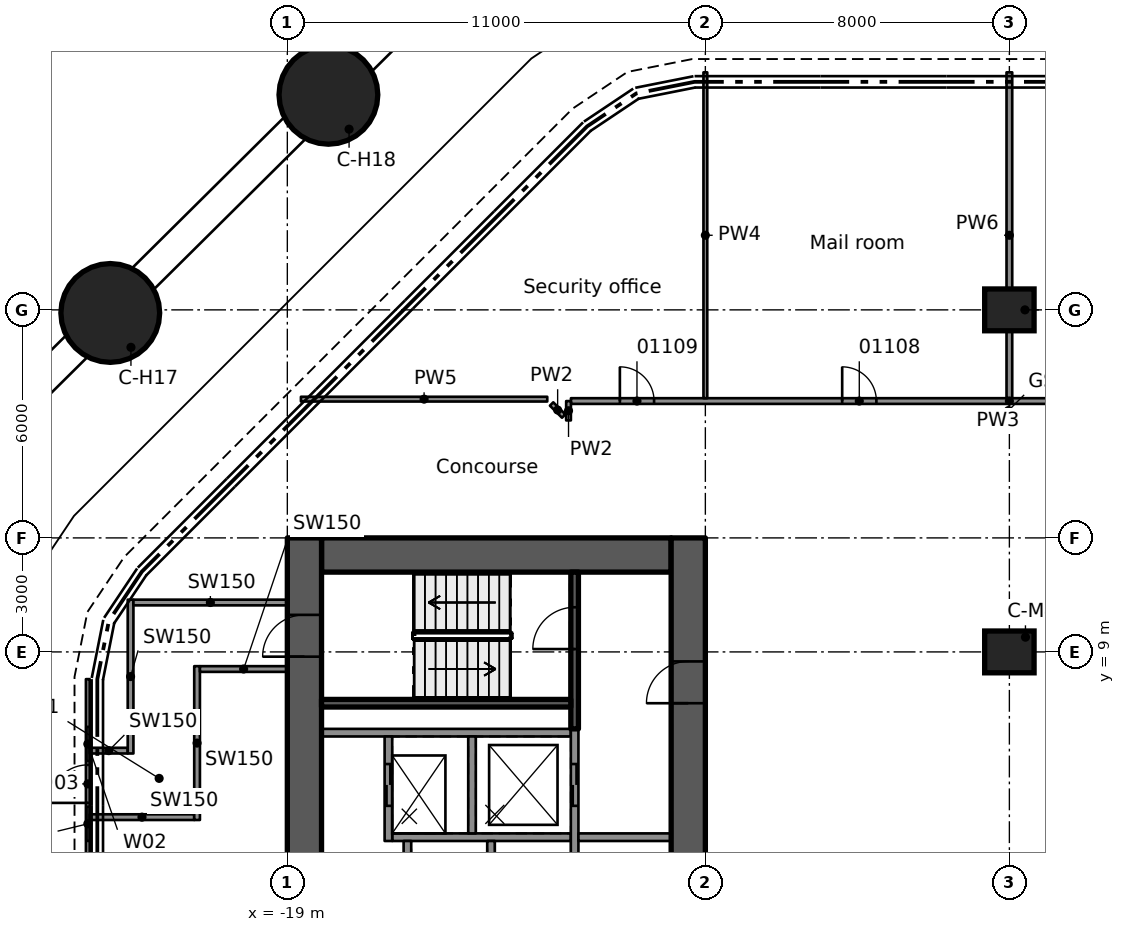
"""IFC4 building model, lengths in metres.
Left out: names, types, materials, properties, quantities, classifications, styles, units other than length and angle.
Written with IfcOpenShell. Run it as: python <this file> out.ifc"""

import sys

from ifc_helpers import new_model, si_unit, direction, frame, frame_2d, origin, origin_2d, place, context, subcontext, project, spatial, rectangle, circle, extrude, element, fill, save


model = new_model("IFC4")
c1 = context("Model", 3, precision=1e-05, world=origin(), true_north=direction((0.0, 1.0)))
c2 = subcontext(c1, "Body", "Model", "MODEL_VIEW")
j1 = project(units=[si_unit("LENGTHUNIT", "METRE"), si_unit("PLANEANGLEUNIT", "RADIAN")], contexts=[c1])
p1 = place(None, origin())
s1 = spatial("IfcSite", under=j1, at=p1, CompositionType="ELEMENT")
p2 = place(p1, origin())
s2 = spatial("IfcBuilding", under=s1, at=p2, CompositionType="ELEMENT")
p3 = place(p2, origin())
s3 = spatial("IfcBuildingStorey", under=s2, at=p3, CompositionType="ELEMENT", Elevation=0.0)
p4 = place(p3, frame((-18.1, 11.55, -0.5), z_axis=(0.0, 0.0, 1.0), x_axis=(1.0, 0.0, 0.0)))
e1 = element("IfcWall", 1, at=p4, inside=s3, PredefinedType="SHEAR", context=c2, shape_type="SweptSolid", body=[
    extrude(rectangle(XDim=9.2, YDim=0.9, at=frame_2d((4.6, 0.0))), origin(), (0.0, 0.0, 1.0), 11.0),
])
p5 = place(p3, frame((-18.55, -12.0, -0.5), z_axis=(0.0, 0.0, 1.0), x_axis=(0.0, 1.0, 0.0)))
e2 = element("IfcWall", 2, at=p5, inside=s3, PredefinedType="SHEAR", context=c2, shape_type="SweptSolid", body=[
    extrude(rectangle(XDim=24.0, YDim=0.9, at=frame_2d((12.0, 0.0))), origin(), (0.0, 0.0, 1.0), 11.0),
])
p6 = place(p5, frame((10.1, 0.0, 0.5)))
e3 = element("IfcOpeningElement", 3, at=p6, cuts=e2, PredefinedType="OPENING", context=c2, shape_type="SweptSolid", body=[
    extrude(rectangle(XDim=1.8, YDim=2.1, at=frame_2d((0.9, 1.05))), frame((0.0, 0.46, 0.0), z_axis=(0.0, -1.0, 0.0), x_axis=(1.0, 0.0, 0.0)), (0.0, 0.0, 1.0), 0.92),
])
p7 = place(p5, frame((20.875, 0.0, 0.5)))
e4 = element("IfcOpeningElement", 4, at=p7, cuts=e2, PredefinedType="OPENING", context=c2, shape_type="SweptSolid", body=[
    extrude(rectangle(XDim=1.1, YDim=2.1, at=frame_2d((0.55, 1.05))), frame((0.0, 0.46, 0.0), z_axis=(0.0, -1.0, 0.0), x_axis=(1.0, 0.0, 0.0)), (0.0, 0.0, 1.0), 0.92),
])
p8 = place(p3, frame((-8.45, -12.0, -0.5), z_axis=(0.0, 0.0, 1.0), x_axis=(0.0, 1.0, 0.0)))
e5 = element("IfcWall", 5, at=p8, inside=s3, PredefinedType="SHEAR", context=c2, shape_type="SweptSolid", body=[
    extrude(rectangle(XDim=24.0, YDim=0.9, at=frame_2d((12.0, 0.0))), origin(), (0.0, 0.0, 1.0), 11.0),
])
p9 = place(p8, frame((9.6, 0.0, 0.5)))
e6 = element("IfcOpeningElement", 6, at=p9, cuts=e5, PredefinedType="OPENING", context=c2, shape_type="SweptSolid", body=[
    extrude(rectangle(XDim=1.8, YDim=2.1, at=frame_2d((0.9, 1.05))), frame((0.0, 0.46, 0.0), z_axis=(0.0, -1.0, 0.0), x_axis=(1.0, 0.0, 0.0)), (0.0, 0.0, 1.0), 0.92),
])
p10 = place(p8, frame((19.65, 0.0, 0.5)))
e7 = element("IfcOpeningElement", 7, at=p10, cuts=e5, PredefinedType="OPENING", context=c2, shape_type="SweptSolid", body=[
    extrude(rectangle(XDim=1.1, YDim=2.1, at=frame_2d((0.55, 1.05))), frame((0.0, 0.46, 0.0), z_axis=(0.0, -1.0, 0.0), x_axis=(1.0, 0.0, 0.0)), (0.0, 0.0, 1.0), 0.92),
])
for number, where, z_axis, x_axis in (
    (8, (-23.659, 17.919, 0.6), (0.0, 0.0, 1.0), (1.0, 0.0, 0.0)),
    (9, (-17.919, 23.659, 0.6), (0.0, 0.0, 1.0), (1.0, 0.0, 0.0)),
):
    element("IfcColumn", number, at=place(p3, frame(where, z_axis=z_axis, x_axis=x_axis)), inside=s3, PredefinedType="COLUMN", context=c2, shape_type="SweptSolid", body=[
        extrude(circle(Radius=1.3, at=origin_2d()), origin(), (0.0, 0.0, 1.0), 8.9),
    ])
for number, where, z_axis, x_axis in (
    (10, (0.0, 9.0, -0.5), (0.0, 0.0, 1.0), (1.0, 0.0, 0.0)),
    (11, (0.0, 18.0, -0.5), (0.0, 0.0, 1.0), (1.0, 0.0, 0.0)),
):
    element("IfcColumn", number, at=place(p3, frame(where, z_axis=z_axis, x_axis=x_axis)), inside=s3, PredefinedType="COLUMN", context=c2, shape_type="SweptSolid", body=[
        extrude(rectangle(XDim=1.3, YDim=1.1, at=origin_2d()), origin(), (0.0, 0.0, 1.0), 11.0),
    ])
p11 = place(p3, frame((-11.54, 6.875, 0.0), z_axis=(0.0, 0.0, 1.0), x_axis=(-1.0, 0.0, 0.0)))
e12 = element("IfcWall", 12, at=p11, inside=s3, PredefinedType="SOLIDWALL", context=c2, shape_type="SweptSolid", body=[
    extrude(rectangle(XDim=6.56, YDim=0.2, at=frame_2d((3.28, 0.0))), origin(), (0.0, 0.0, 1.0), 10.09),
])
p12 = place(p3, frame((-11.54, 4.125, 0.0), z_axis=(0.0, 0.0, 1.0), x_axis=(-1.0, 0.0, 0.0)))
e13 = element("IfcWall", 13, at=p12, inside=s3, PredefinedType="SOLIDWALL", context=c2, shape_type="SweptSolid", body=[
    extrude(rectangle(XDim=4.7, YDim=0.2, at=frame_2d((2.35, 0.0))), origin(), (0.0, 0.0, 1.0), 10.09),
])
p13 = place(p3, frame((-11.44, -6.975, 0.0), z_axis=(0.0, 0.0, 1.0), x_axis=(0.0, 1.0, 0.0)))
e14 = element("IfcWall", 14, at=p13, inside=s3, PredefinedType="SOLIDWALL", context=c2, shape_type="SweptSolid", body=[
    extrude(rectangle(XDim=13.95, YDim=0.2, at=frame_2d((6.975, 0.0))), origin(), (0.0, 0.0, 1.0), 10.09),
])
p14 = place(p13, frame((0.925, 0.0, 0.0)))
e15 = element("IfcOpeningElement", 15, at=p14, cuts=e14, PredefinedType="OPENING", context=c2, shape_type="SweptSolid", body=[
    extrude(rectangle(XDim=1.1, YDim=2.1, at=frame_2d((0.55, 1.05))), frame((0.0, 0.11, 0.0), z_axis=(0.0, -1.0, 0.0), x_axis=(1.0, 0.0, 0.0)), (0.0, 0.0, 1.0), 0.22),
])
p15 = place(p13, frame((3.675, 0.0, 0.0)))
e16 = element("IfcOpeningElement", 16, at=p15, cuts=e14, PredefinedType="OPENING", context=c2, shape_type="SweptSolid", body=[
    extrude(rectangle(XDim=1.1, YDim=2.1, at=frame_2d((0.55, 1.05))), frame((0.0, 0.11, 0.0), z_axis=(0.0, -1.0, 0.0), x_axis=(1.0, 0.0, 0.0)), (0.0, 0.0, 1.0), 0.22),
])
p16 = place(p13, frame((6.425, 0.0, 0.0)))
e17 = element("IfcOpeningElement", 17, at=p16, cuts=e14, PredefinedType="OPENING", context=c2, shape_type="SweptSolid", body=[
    extrude(rectangle(XDim=1.1, YDim=2.1, at=frame_2d((0.55, 1.05))), frame((0.0, 0.11, 0.0), z_axis=(0.0, -1.0, 0.0), x_axis=(1.0, 0.0, 0.0)), (0.0, 0.0, 1.0), 0.22),
])
p17 = place(p13, frame((9.175, 0.0, 0.0)))
e18 = element("IfcOpeningElement", 18, at=p17, cuts=e14, PredefinedType="OPENING", context=c2, shape_type="SweptSolid", body=[
    extrude(rectangle(XDim=1.1, YDim=2.1, at=frame_2d((0.55, 1.05))), frame((0.0, 0.11, 0.0), z_axis=(0.0, -1.0, 0.0), x_axis=(1.0, 0.0, 0.0)), (0.0, 0.0, 1.0), 0.22),
])
p18 = place(p13, frame((11.925, 0.0, 0.0)))
e19 = element("IfcOpeningElement", 19, at=p18, cuts=e14, PredefinedType="OPENING", context=c2, shape_type="SweptSolid", body=[
    extrude(rectangle(XDim=1.1, YDim=2.1, at=frame_2d((0.55, 1.05))), frame((0.0, 0.11, 0.0), z_axis=(0.0, -1.0, 0.0), x_axis=(1.0, 0.0, 0.0)), (0.0, 0.0, 1.0), 0.22),
])
for number, where, z_axis, x_axis in (
    (20, (-13.64, 1.475, 0.0), (0.0, 0.0, 1.0), (0.0, 1.0, 0.0)),
    (21, (-14.14, 4.225, 0.0), (0.0, 0.0, 1.0), (0.0, 1.0, 0.0)),
):
    element("IfcWall", number, at=place(p3, frame(where, z_axis=z_axis, x_axis=x_axis)), inside=s3, PredefinedType="SOLIDWALL", context=c2, shape_type="SweptSolid", body=[
        extrude(rectangle(XDim=2.55, YDim=0.2, at=frame_2d((1.275, 0.0))), origin(), (0.0, 0.0, 1.0), 10.09),
    ])
p19 = place(p3, frame((-15.84, -4.025, 0.0), z_axis=(0.0, 0.0, 1.0), x_axis=(0.0, 1.0, 0.0)))
e22 = element("IfcWall", 22, at=p19, inside=s3, PredefinedType="SOLIDWALL", context=c2, shape_type="SweptSolid", body=[
    extrude(rectangle(XDim=8.05, YDim=0.2, at=frame_2d((4.025, 0.0))), origin(), (0.0, 0.0, 1.0), 10.09),
])
p20 = place(p19, frame((0.725, 0.0, 0.0)))
e23 = element("IfcOpeningElement", 23, at=p20, cuts=e22, PredefinedType="OPENING", context=c2, shape_type="SweptSolid", body=[
    extrude(rectangle(XDim=1.1, YDim=2.1, at=frame_2d((0.55, 1.05))), frame((0.0, 0.11, 0.0), z_axis=(0.0, -1.0, 0.0), x_axis=(1.0, 0.0, 0.0)), (0.0, 0.0, 1.0), 0.22),
])
p21 = place(p19, frame((3.475, 0.0, 0.0)))
e24 = element("IfcOpeningElement", 24, at=p21, cuts=e22, PredefinedType="OPENING", context=c2, shape_type="SweptSolid", body=[
    extrude(rectangle(XDim=1.1, YDim=2.1, at=frame_2d((0.55, 1.05))), frame((0.0, 0.11, 0.0), z_axis=(0.0, -1.0, 0.0), x_axis=(1.0, 0.0, 0.0)), (0.0, 0.0, 1.0), 0.22),
])
p22 = place(p19, frame((6.225, 0.0, 0.0)))
e25 = element("IfcOpeningElement", 25, at=p22, cuts=e22, PredefinedType="OPENING", context=c2, shape_type="SweptSolid", body=[
    extrude(rectangle(XDim=1.1, YDim=2.1, at=frame_2d((0.55, 1.05))), frame((0.0, 0.11, 0.0), z_axis=(0.0, -1.0, 0.0), x_axis=(1.0, 0.0, 0.0)), (0.0, 0.0, 1.0), 0.22),
])
p23 = place(p3, frame((-16.34, 4.025, 0.0), z_axis=(0.0, 0.0, 1.0), x_axis=(0.0, 1.0, 0.0)))
e26 = element("IfcWall", 26, at=p23, inside=s3, PredefinedType="SOLIDWALL", context=c2, shape_type="SweptSolid", body=[
    extrude(rectangle(XDim=2.75, YDim=0.2, at=frame_2d((1.375, 0.0))), origin(), (0.0, 0.0, 1.0), 10.09),
])
p24 = place(p23, frame((0.925, 0.0, 0.0)))
e27 = element("IfcOpeningElement", 27, at=p24, cuts=e26, PredefinedType="OPENING", context=c2, shape_type="SweptSolid", body=[
    extrude(rectangle(XDim=1.1, YDim=2.1, at=frame_2d((0.55, 1.05))), frame((0.0, 0.11, 0.0), z_axis=(0.0, -1.0, 0.0), x_axis=(1.0, 0.0, 0.0)), (0.0, 0.0, 1.0), 0.22),
])
p25 = place(p3, frame((-11.44, 6.975, 0.0), z_axis=(0.0, 0.0, 1.0), x_axis=(0.0, 1.0, 0.0)))
e28 = element("IfcWall", 28, at=p25, inside=s3, PredefinedType="SOLIDWALL", context=c2, shape_type="SweptSolid", body=[
    extrude(rectangle(XDim=4.125, YDim=0.2, at=frame_2d((2.062, 0.0))), origin(), (0.0, 0.0, 1.0), 10.09),
])
p26 = place(p25, frame((2.1, 0.0, 0.0)))
e29 = element("IfcOpeningElement", 29, at=p26, cuts=e28, PredefinedType="OPENING", context=c2, shape_type="SweptSolid", body=[
    extrude(rectangle(XDim=1.1, YDim=2.1, at=frame_2d((0.55, 1.05))), frame((0.0, 0.11, 0.0), z_axis=(0.0, -1.0, 0.0), x_axis=(1.0, 0.0, 0.0)), (0.0, 0.0, 1.0), 0.22),
])
p27 = place(p3, frame((-11.54, 7.65, 0.0), z_axis=(0.0, 0.0, 1.0), x_axis=(-1.0, 0.0, 0.0)))
e30 = element("IfcWall", 30, at=p27, inside=s3, PredefinedType="SOLIDWALL", context=c2, shape_type="SweptSolid", body=[
    extrude(rectangle(XDim=6.56, YDim=0.2, at=frame_2d((3.28, 0.0))), origin(), (0.0, 0.0, 1.0), 10.09),
])
p28 = place(p3, frame((-8.9, 4.125, 0.0), z_axis=(0.0, 0.0, 1.0), x_axis=(-1.0, 0.0, 0.0)))
e31 = element("IfcWall", 31, at=p28, inside=s3, PredefinedType="PARTITIONING", context=c2, shape_type="SweptSolid", body=[
    extrude(rectangle(XDim=2.44, YDim=0.2, at=frame_2d((1.22, 0.0))), origin(), (0.0, 0.0, 1.0), 10.09),
])
p29 = place(p3, frame((-24.25, 2.771, -0.4), z_axis=(0.0, 0.0, 1.0), x_axis=(0.0, 1.0, 0.0)))
e32 = element("IfcWall", 32, at=p29, inside=s3, PredefinedType="STANDARD", context=c2, shape_type="SweptSolid", body=[
    extrude(rectangle(XDim=5.513, YDim=0.1, at=frame_2d((2.757, 0.0))), origin(), (0.0, 0.0, 1.0), 10.5),
])
p30 = place(p29, frame((2.257, 0.0, 0.4)))
e33 = element("IfcOpeningElement", 33, at=p30, cuts=e32, PredefinedType="OPENING", context=c2, shape_type="SweptSolid", body=[
    extrude(rectangle(XDim=1.0, YDim=2.4, at=frame_2d((0.5, 1.2))), frame((0.0, 0.06, 0.0), z_axis=(0.0, -1.0, 0.0), x_axis=(1.0, 0.0, 0.0)), (0.0, 0.0, 1.0), 0.12),
])
p31 = place(p29, frame((1.257, 0.0, 0.4)))
e34 = element("IfcOpeningElement", 34, at=p31, cuts=e32, PredefinedType="OPENING", context=c2, shape_type="SweptSolid", body=[
    extrude(rectangle(XDim=0.9, YDim=2.4, at=frame_2d((0.45, 1.2))), frame((0.0, 0.06, 0.0), z_axis=(0.0, -1.0, 0.0), x_axis=(1.0, 0.0, 0.0)), (0.0, 0.0, 1.0), 0.12),
])
p32 = place(p29, frame((3.357, 0.0, 0.4)))
e35 = element("IfcOpeningElement", 35, at=p32, cuts=e32, PredefinedType="OPENING", context=c2, shape_type="SweptSolid", body=[
    extrude(rectangle(XDim=0.9, YDim=2.4, at=frame_2d((0.45, 1.2))), frame((0.0, 0.06, 0.0), z_axis=(0.0, -1.0, 0.0), x_axis=(1.0, 0.0, 0.0)), (0.0, 0.0, 1.0), 0.12),
])
p33 = place(p3, frame((-24.2, 6.402, 0.0), z_axis=(0.0, 0.0, 1.0), x_axis=(1.0, 0.0, 0.0)))
e36 = element("IfcWall", 36, at=p33, inside=s3, PredefinedType="SOLIDWALL", context=c2, shape_type="SweptSolid", body=[
    extrude(rectangle(XDim=1.0, YDim=0.15, at=frame_2d((0.5, 0.0))), origin(), (0.0, 0.0, 1.0), 10.09),
])
p34 = place(p3, frame((-23.125, 6.327, 0.0), z_axis=(0.0, 0.0, 1.0), x_axis=(0.0, 1.0, 0.0)))
e37 = element("IfcWall", 37, at=p34, inside=s3, PredefinedType="SOLIDWALL", context=c2, shape_type="SweptSolid", body=[
    extrude(rectangle(XDim=4.048, YDim=0.15, at=frame_2d((2.024, 0.0))), origin(), (0.0, 0.0, 1.0), 10.09),
])
p35 = place(p3, frame((-23.05, 10.3, 0.0), z_axis=(0.0, 0.0, 1.0), x_axis=(1.0, 0.0, 0.0)))
e38 = element("IfcWall", 38, at=p35, inside=s3, PredefinedType="SOLIDWALL", context=c2, shape_type="SweptSolid", body=[
    extrude(rectangle(XDim=4.05, YDim=0.15, at=frame_2d((2.025, 0.0))), origin(), (0.0, 0.0, 1.0), 10.09),
])
p36 = place(p3, frame((-24.2, 4.652, 0.0), z_axis=(0.0, 0.0, 1.0), x_axis=(1.0, 0.0, 0.0)))
e39 = element("IfcWall", 39, at=p36, inside=s3, PredefinedType="SOLIDWALL", context=c2, shape_type="SweptSolid", body=[
    extrude(rectangle(XDim=2.75, YDim=0.15, at=frame_2d((1.375, 0.0))), origin(), (0.0, 0.0, 1.0), 10.09),
])
p37 = place(p3, frame((-21.375, 4.577, 0.0), z_axis=(0.0, 0.0, 1.0), x_axis=(0.0, 1.0, 0.0)))
e40 = element("IfcWall", 40, at=p37, inside=s3, PredefinedType="SOLIDWALL", context=c2, shape_type="SweptSolid", body=[
    extrude(rectangle(XDim=4.048, YDim=0.15, at=frame_2d((2.024, 0.0))), origin(), (0.0, 0.0, 1.0), 10.09),
])
p38 = place(p3, frame((-21.3, 8.55, 0.0), z_axis=(0.0, 0.0, 1.0), x_axis=(1.0, 0.0, 0.0)))
e41 = element("IfcWall", 41, at=p38, inside=s3, PredefinedType="SOLIDWALL", context=c2, shape_type="SweptSolid", body=[
    extrude(rectangle(XDim=2.3, YDim=0.15, at=frame_2d((1.15, 0.0))), origin(), (0.0, 0.0, 1.0), 10.09),
])
p39 = place(p3, frame((-12.046, 15.524, 0.0), z_axis=(0.0, 0.0, 1.0), x_axis=(0.707106781187, -0.707106781187, 0.0)))
e42 = element("IfcWall", 42, at=p39, inside=s3, PredefinedType="PARTITIONING", context=c2, shape_type="SweptSolid", body=[
    extrude(rectangle(XDim=0.449, YDim=0.125, at=frame_2d((0.225, 0.0))), origin(), (0.0, 0.0, 1.0), 10.1),
])
p40 = place(p3, frame((-11.537, 15.601, 0.0), z_axis=(0.0, 0.0, 1.0), x_axis=(1.0, 0.0, 0.0)))
e43 = element("IfcWall", 43, at=p40, inside=s3, PredefinedType="PARTITIONING", context=c2, shape_type="SweptSolid", body=[
    extrude(rectangle(XDim=23.074, YDim=0.15, at=frame_2d((11.537, 0.0))), origin(), (0.0, 0.0, 1.0), 10.1),
])
p41 = place(p40, frame((20.887, 0.0, 0.0)))
e44 = element("IfcOpeningElement", 44, at=p41, cuts=e43, PredefinedType="OPENING", context=c2, shape_type="SweptSolid", body=[
    extrude(rectangle(XDim=1.0, YDim=2.1, at=frame_2d((0.5, 1.05))), frame((0.0, 0.085, 0.0), z_axis=(0.0, -1.0, 0.0), x_axis=(1.0, 0.0, 0.0)), (0.0, 0.0, 1.0), 0.17),
])
p42 = place(p40, frame((15.137, 0.0, 0.0)))
e45 = element("IfcOpeningElement", 45, at=p42, cuts=e43, PredefinedType="OPENING", context=c2, shape_type="SweptSolid", body=[
    extrude(rectangle(XDim=0.9, YDim=2.1, at=frame_2d((0.45, 1.05))), frame((0.0, 0.085, 0.0), z_axis=(0.0, -1.0, 0.0), x_axis=(1.0, 0.0, 0.0)), (0.0, 0.0, 1.0), 0.17),
])
p43 = place(p40, frame((7.137, 0.0, 0.0)))
e46 = element("IfcOpeningElement", 46, at=p43, cuts=e43, PredefinedType="OPENING", context=c2, shape_type="SweptSolid", body=[
    extrude(rectangle(XDim=0.9, YDim=2.1, at=frame_2d((0.45, 1.05))), frame((0.0, 0.085, 0.0), z_axis=(0.0, -1.0, 0.0), x_axis=(1.0, 0.0, 0.0)), (0.0, 0.0, 1.0), 0.17),
])
p44 = place(p40, frame((1.288, 0.0, 0.0)))
e47 = element("IfcOpeningElement", 47, at=p44, cuts=e43, PredefinedType="OPENING", context=c2, shape_type="SweptSolid", body=[
    extrude(rectangle(XDim=0.9, YDim=2.1, at=frame_2d((0.45, 1.05))), frame((0.0, 0.085, 0.0), z_axis=(0.0, -1.0, 0.0), x_axis=(1.0, 0.0, 0.0)), (0.0, 0.0, 1.0), 0.17),
])
p45 = place(p3, frame((-18.642, 15.651, 0.0), z_axis=(0.0, 0.0, 1.0), x_axis=(1.0, 0.0, 0.0)))
e48 = element("IfcWall", 48, at=p45, inside=s3, PredefinedType="PARTITIONING", context=c2, shape_type="SweptSolid", body=[
    extrude(rectangle(XDim=6.482, YDim=0.125, at=frame_2d((3.241, 0.0))), origin(), (0.0, 0.0, 1.0), 6.98),
])
p46 = place(p3, frame((-11.601, 15.092, 0.0), z_axis=(0.0, 0.0, 1.0), x_axis=(0.00192214926, 0.999998152669, 0.0)))
e49 = element("IfcWall", 49, at=p46, inside=s3, PredefinedType="PARTITIONING", context=c2, shape_type="SweptSolid", body=[
    extrude(rectangle(XDim=0.508, YDim=0.125, at=frame_2d((0.254, 0.0))), origin(), (0.0, 0.0, 1.0), 10.1),
])
p47 = place(p3, frame((0.0, 15.676, 0.0), z_axis=(0.0, 0.0, 1.0), x_axis=(0.0, 1.0, 0.0)))
e50 = element("IfcWall", 50, at=p47, inside=s3, PredefinedType="PARTITIONING", context=c2, shape_type="SweptSolid", body=[
    extrude(rectangle(XDim=8.574, YDim=0.15, at=frame_2d((4.287, 0.0))), origin(), (0.0, 0.0, 1.0), 6.98),
])
p48 = place(p3, frame((-8.0, 15.676, 0.0), z_axis=(0.0, 0.0, 1.0), x_axis=(0.0, 1.0, 0.0)))
e51 = element("IfcWall", 51, at=p48, inside=s3, PredefinedType="PARTITIONING", context=c2, shape_type="SweptSolid", body=[
    extrude(rectangle(XDim=8.574, YDim=0.1, at=frame_2d((4.287, 0.0))), origin(), (0.0, 0.0, 1.0), 6.98),
])
p49 = place(p18, origin())
e52 = element("IfcDoor", 52, at=p49, inside=s3, OperationType="DOUBLE_DOOR_SLIDING", PredefinedType="DOOR", context=c2, shape_type="SweptSolid", body=[
    extrude(rectangle(XDim=1.1, YDim=2.1, at=frame_2d((0.55, 1.05))), frame((0.0, 0.025, 0.0), z_axis=(0.0, -1.0, 0.0), x_axis=(1.0, 0.0, 0.0)), (0.0, 0.0, 1.0), 0.05),
])
fill(e19, e52)
p50 = place(p24, origin())
e53 = element("IfcDoor", 53, at=p50, inside=s3, OperationType="DOUBLE_DOOR_SLIDING", PredefinedType="DOOR", context=c2, shape_type="SweptSolid", body=[
    extrude(rectangle(XDim=1.1, YDim=2.1, at=frame_2d((0.55, 1.05))), frame((0.0, 0.025, 0.0), z_axis=(0.0, -1.0, 0.0), x_axis=(1.0, 0.0, 0.0)), (0.0, 0.0, 1.0), 0.05),
])
fill(e27, e53)
p51 = place(p10, origin())
e54 = element("IfcDoor", 54, at=p51, inside=s3, OperationType="SINGLE_SWING_RIGHT", PredefinedType="DOOR", context=c2, shape_type="SweptSolid", body=[
    extrude(rectangle(XDim=1.1, YDim=2.1, at=frame_2d((0.55, 1.05))), frame((0.0, 0.025, 0.0), z_axis=(0.0, -1.0, 0.0), x_axis=(1.0, 0.0, 0.0)), (0.0, 0.0, 1.0), 0.05),
])
fill(e7, e54)
p52 = place(p26, origin())
e55 = element("IfcDoor", 55, at=p52, inside=s3, OperationType="SINGLE_SWING_RIGHT", PredefinedType="DOOR", context=c2, shape_type="SweptSolid", body=[
    extrude(rectangle(XDim=1.1, YDim=2.1, at=frame_2d((0.55, 1.05))), frame((0.0, 0.025, 0.0), z_axis=(0.0, -1.0, 0.0), x_axis=(1.0, 0.0, 0.0)), (0.0, 0.0, 1.0), 0.05),
])
fill(e29, e55)
p53 = place(p30, origin())
e56 = element("IfcDoor", 56, at=p53, inside=s3, OperationType="SINGLE_SWING_RIGHT", PredefinedType="DOOR", context=c2, shape_type="SweptSolid", body=[
    extrude(rectangle(XDim=1.0, YDim=2.4, at=frame_2d((0.5, 1.2))), frame((0.0, 0.025, 0.0), z_axis=(0.0, -1.0, 0.0), x_axis=(1.0, 0.0, 0.0)), (0.0, 0.0, 1.0), 0.05),
])
fill(e33, e56)
p54 = place(p31, origin())
e57 = element("IfcWindow", 57, at=p54, inside=s3, PartitioningType="SINGLE_PANEL", PredefinedType="WINDOW", context=c2, shape_type="SweptSolid", body=[
    extrude(rectangle(XDim=0.9, YDim=2.4, at=frame_2d((0.45, 1.2))), frame((0.0, 0.03, 0.0), z_axis=(0.0, -1.0, 0.0), x_axis=(1.0, 0.0, 0.0)), (0.0, 0.0, 1.0), 0.06),
])
fill(e34, e57)
p55 = place(p32, origin())
e58 = element("IfcWindow", 58, at=p55, inside=s3, PartitioningType="SINGLE_PANEL", PredefinedType="WINDOW", context=c2, shape_type="SweptSolid", body=[
    extrude(rectangle(XDim=0.9, YDim=2.4, at=frame_2d((0.45, 1.2))), frame((0.0, 0.03, 0.0), z_axis=(0.0, -1.0, 0.0), x_axis=(1.0, 0.0, 0.0)), (0.0, 0.0, 1.0), 0.06),
])
fill(e35, e58)
p56 = place(p7, origin())
e59 = element("IfcDoor", 59, at=p56, inside=s3, OperationType="SINGLE_SWING_RIGHT", PredefinedType="DOOR", context=c2, shape_type="SweptSolid", body=[
    extrude(rectangle(XDim=1.1, YDim=2.1, at=frame_2d((0.55, 1.05))), frame((0.0, 0.025, 0.0), z_axis=(0.0, -1.0, 0.0), x_axis=(1.0, 0.0, 0.0)), (0.0, 0.0, 1.0), 0.05),
])
fill(e4, e59)
p57 = place(p43, origin())
e60 = element("IfcDoor", 60, at=p57, inside=s3, OperationType="SINGLE_SWING_LEFT", PredefinedType="DOOR", context=c2, shape_type="SweptSolid", body=[
    extrude(rectangle(XDim=0.9, YDim=2.1, at=frame_2d((0.45, 1.05))), frame((0.0, 0.025, 0.0), z_axis=(0.0, -1.0, 0.0), x_axis=(1.0, 0.0, 0.0)), (0.0, 0.0, 1.0), 0.05),
])
fill(e46, e60)
p58 = place(p44, origin())
e61 = element("IfcDoor", 61, at=p58, inside=s3, OperationType="SINGLE_SWING_LEFT", PredefinedType="DOOR", context=c2, shape_type="SweptSolid", body=[
    extrude(rectangle(XDim=0.9, YDim=2.1, at=frame_2d((0.45, 1.05))), frame((0.0, 0.025, 0.0), z_axis=(0.0, -1.0, 0.0), x_axis=(1.0, 0.0, 0.0)), (0.0, 0.0, 1.0), 0.05),
])
fill(e47, e61)
save(model, sys.argv[1])
